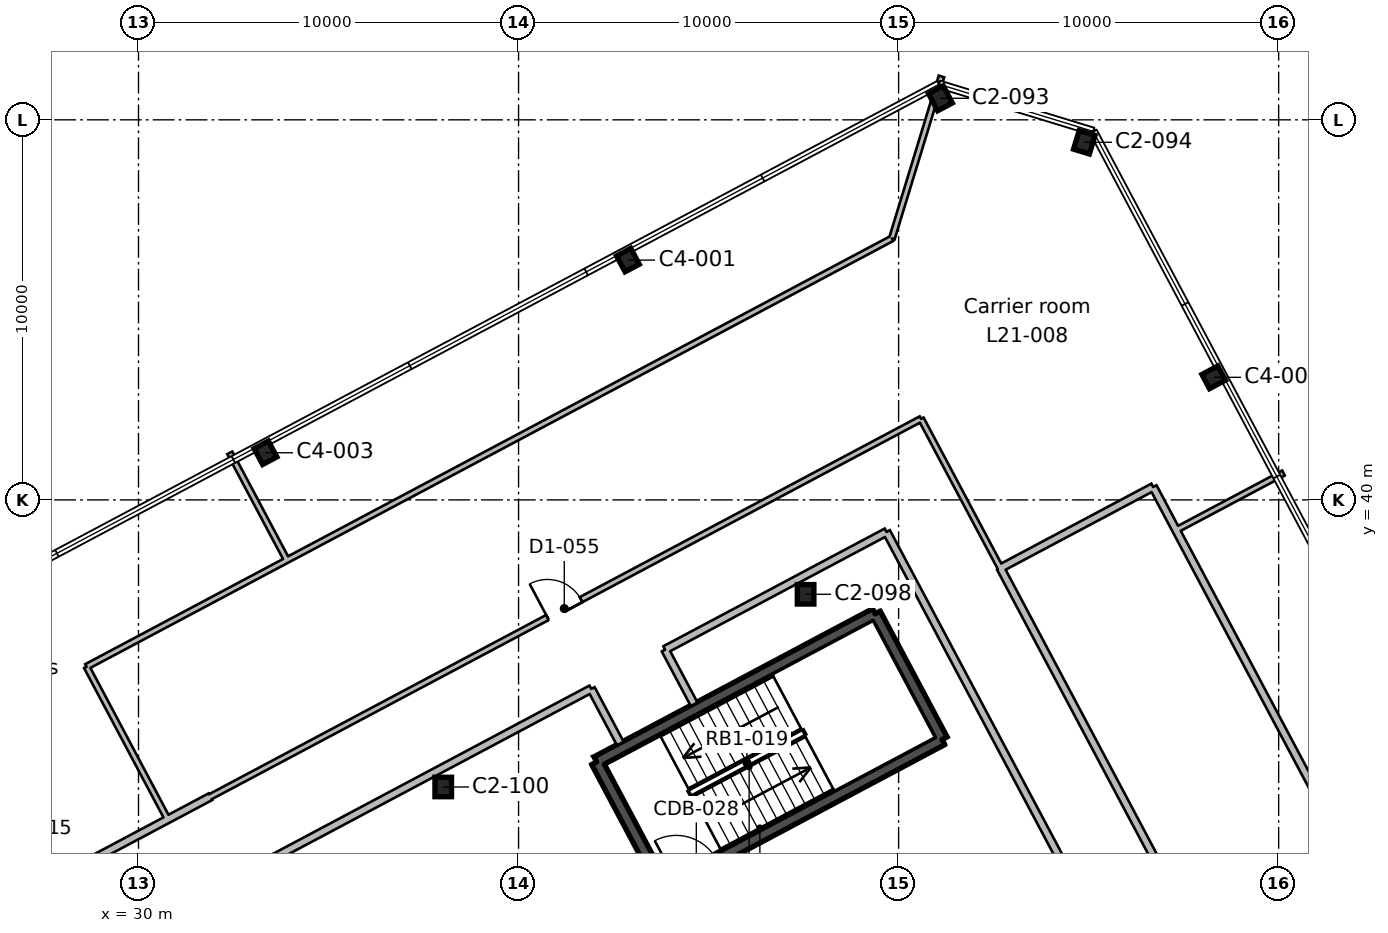
"""IFC4 building model, lengths in metres.
Left out: names, types, materials, properties, quantities, classifications, styles, units other than length and angle.
Written with IfcOpenShell. Run it as: python <this file> out.ifc"""

import sys

from ifc_helpers import new_model, si_unit, direction, frame, frame_2d, origin, origin_2d, place, context, subcontext, project, spatial, rectangle, i_section, extrude, element, fill, save


model = new_model("IFC4")
c1 = context("Model", 3, precision=1e-05, world=origin(), true_north=direction((0.0, 1.0)))
c2 = subcontext(c1, "Body", "Model", "MODEL_VIEW")
j1 = project(units=[si_unit("LENGTHUNIT", "METRE"), si_unit("PLANEANGLEUNIT", "RADIAN")], contexts=[c1])
p1 = place(None, origin())
s1 = spatial("IfcSite", under=j1, at=p1, CompositionType="ELEMENT")
p2 = place(p1, origin())
s2 = spatial("IfcBuilding", under=s1, at=p2, CompositionType="ELEMENT")
p3 = place(p2, frame((0.0, 0.0, 107.6)))
s3 = spatial("IfcBuildingStorey", under=s2, at=p3, CompositionType="ELEMENT", Elevation=107.6)
for number, where, z_axis, x_axis in (
    (1, (38.018, 32.446, 0.0), (0.0, 0.0, 1.0), (1.0, 0.0, 0.0)),
    (2, (47.553, 37.516, 0.0), (0.0, 0.0, 1.0), (1.0, 0.0, 0.0)),
):
    element("IfcColumn", number, at=place(p3, frame(where, z_axis=z_axis, x_axis=x_axis)), inside=s3, PredefinedType="COLUMN", context=c2, shape_type="SweptSolid", body=[
        extrude(i_section(OverallWidth=0.437, OverallDepth=0.513, WebThickness=0.061, FlangeThickness=0.097, FilletRadius=0.015, at=origin_2d()), origin(), (0.0, 0.0, 1.0), 4.6),
    ])
for number, where, z_axis, x_axis in (
    (3, (33.342, 41.24, 0.0), (0.0, 0.0, 1.0), (-0.883, -0.469, 0.0)),
    (4, (58.29, 43.225, 0.0), (0.0, 0.0, 1.0), (-0.469, 0.883, 0.0)),
    (5, (42.877, 46.31, 0.0), (0.0, 0.0, 1.0), (-0.883, -0.469, 0.0)),
):
    element("IfcColumn", number, at=place(p3, frame(where, z_axis=z_axis, x_axis=x_axis)), inside=s3, PredefinedType="COLUMN", context=c2, shape_type="SweptSolid", body=[
        extrude(i_section(OverallWidth=0.424, OverallDepth=0.475, WebThickness=0.048, FlangeThickness=0.077, FilletRadius=0.015, at=origin_2d()), origin(), (0.0, 0.0, 1.0), 4.6),
    ])
for number, where, z_axis, x_axis in (
    (6, (54.886, 49.41, 0.0), (0.0, 0.0, 1.0), (-0.956, 0.292, 0.0)),
    (7, (51.1, 50.567, 0.0), (0.0, 0.0, 1.0), (-0.883, -0.469, 0.0)),
):
    element("IfcColumn", number, at=place(p3, frame(where, z_axis=z_axis, x_axis=x_axis)), inside=s3, PredefinedType="COLUMN", context=c2, shape_type="SweptSolid", body=[
        extrude(i_section(OverallWidth=0.437, OverallDepth=0.513, WebThickness=0.061, FlangeThickness=0.097, FilletRadius=0.015, at=origin_2d()), origin(), (0.0, 0.0, 1.0), 4.6),
    ])
p4 = place(p3, frame((49.384, 37.004, 0.0), z_axis=(0.0, 0.0, 1.0), x_axis=(0.46946936446, -0.882948761726, 0.0)))
e8 = element("IfcWall", 8, at=p4, inside=s3, PredefinedType="SHEAR", context=c2, shape_type="SweptSolid", body=[
    extrude(rectangle(XDim=3.75, YDim=0.3, at=frame_2d((1.875, 0.0))), origin(), (0.0, 0.0, 1.0), 4.6),
])
p5 = place(p3, frame((51.145, 33.693, 0.0), z_axis=(0.0, 0.0, 1.0), x_axis=(-0.882945809314, -0.469474917132, 0.0)))
e9 = element("IfcWall", 9, at=p5, inside=s3, PredefinedType="SHEAR", context=c2, shape_type="SweptSolid", body=[
    extrude(rectangle(XDim=8.3, YDim=0.3, at=frame_2d((4.15, 0.0))), origin(), (0.0, 0.0, 1.0), 4.6),
])
p6 = place(p5, frame((6.725, 0.0, 0.0)))
e10 = element("IfcOpeningElement", 10, at=p6, cuts=e9, PredefinedType="OPENING", context=c2, shape_type="SweptSolid", body=[
    extrude(rectangle(XDim=1.2, YDim=2.1, at=frame_2d((0.6, 1.05))), frame((0.0, 0.16, 0.0), z_axis=(0.0, -1.0, 0.0), x_axis=(1.0, 0.0, 0.0)), (0.0, 0.0, 1.0), 0.32),
])
p7 = place(p3, frame((43.816, 29.796, 0.0), z_axis=(0.0, 0.0, 1.0), x_axis=(-0.46946936446, 0.882948761726, 0.0)))
e11 = element("IfcWall", 11, at=p7, inside=s3, PredefinedType="SHEAR", context=c2, shape_type="SweptSolid", body=[
    extrude(rectangle(XDim=3.75, YDim=0.3, at=frame_2d((1.875, 0.0))), origin(), (0.0, 0.0, 1.0), 4.6),
])
p8 = place(p3, frame((42.055, 33.107, 0.0), z_axis=(0.0, 0.0, 1.0), x_axis=(0.882945809314, 0.469474917132, 0.0)))
e12 = element("IfcWall", 12, at=p8, inside=s3, PredefinedType="SHEAR", context=c2, shape_type="SweptSolid", body=[
    extrude(rectangle(XDim=8.3, YDim=0.3, at=frame_2d((4.15, 0.0))), origin(), (0.0, 0.0, 1.0), 4.6),
])
p9 = place(p3, frame((0.0, 15.233, 0.0), z_axis=(0.0, 0.0, 1.0), x_axis=(0.882948052406, 0.469470698502, 0.0)))
e13 = element("IfcWall", 13, at=p9, inside=s3, PredefinedType="PARTITIONING", context=c2, shape_type="SweptSolid", body=[
    extrude(rectangle(XDim=36.115, YDim=0.2, at=frame_2d((18.058, 0.0))), origin(), (0.0, 0.0, 1.0), 4.15),
])
p10 = place(p9, frame((30.45, 0.0, 0.0)))
e14 = element("IfcOpeningElement", 14, at=p10, cuts=e13, PredefinedType="OPENING", context=c2, shape_type="SweptSolid", body=[
    extrude(rectangle(XDim=0.95, YDim=2.1, at=frame_2d((0.475, 1.05))), frame((0.0, 0.11, 0.0), z_axis=(0.0, -1.0, 0.0), x_axis=(1.0, 0.0, 0.0)), (0.0, 0.0, 1.0), 0.22),
])
p11 = place(p9, frame((19.95, 0.0, 0.0)))
e15 = element("IfcOpeningElement", 15, at=p11, cuts=e13, PredefinedType="OPENING", context=c2, shape_type="SweptSolid", body=[
    extrude(rectangle(XDim=1.0, YDim=2.1, at=frame_2d((0.5, 1.05))), frame((0.0, 0.11, 0.0), z_axis=(0.0, -1.0, 0.0), x_axis=(1.0, 0.0, 0.0)), (0.0, 0.0, 1.0), 0.22),
])
p12 = place(p9, frame((17.55, 0.0, 0.0)))
e16 = element("IfcOpeningElement", 16, at=p12, cuts=e13, PredefinedType="OPENING", context=c2, shape_type="SweptSolid", body=[
    extrude(rectangle(XDim=1.0, YDim=2.1, at=frame_2d((0.5, 1.05))), frame((0.0, 0.11, 0.0), z_axis=(0.0, -1.0, 0.0), x_axis=(1.0, 0.0, 0.0)), (0.0, 0.0, 1.0), 0.22),
])
p13 = place(p3, frame((30.761, 31.608, 0.0), z_axis=(0.0, 0.0, 1.0), x_axis=(-0.469369141446, 0.883002043632, 0.0)))
e17 = element("IfcWall", 17, at=p13, inside=s3, PredefinedType="PARTITIONING", context=c2, shape_type="SweptSolid", body=[
    extrude(rectangle(XDim=4.534, YDim=0.15, at=frame_2d((2.267, 0.0))), origin(), (0.0, 0.0, 1.0), 4.15),
])
p14 = place(p3, frame((28.633, 35.611, 0.0), z_axis=(0.0, 0.0, 1.0), x_axis=(0.882899375274, 0.469562235642, 0.0)))
e18 = element("IfcWall", 18, at=p14, inside=s3, PredefinedType="PARTITIONING", context=c2, shape_type="SweptSolid", body=[
    extrude(rectangle(XDim=5.905, YDim=0.15, at=frame_2d((2.953, 0.0))), origin(), (0.0, 0.0, 1.0), 4.15),
])
p15 = place(p3, frame((52.678, 38.21, 0.0), z_axis=(0.0, 0.0, 1.0), x_axis=(-0.469641219027, 0.882857364126, 0.0)))
e19 = element("IfcWall", 19, at=p15, inside=s3, PredefinedType="PARTITIONING", context=c2, shape_type="SweptSolid", body=[
    extrude(rectangle(XDim=4.444, YDim=0.15, at=frame_2d((2.222, 0.0))), origin(), (0.0, 0.0, 1.0), 4.15),
])
p16 = place(p3, frame((31.888, 32.188, 0.0), z_axis=(0.0, 0.0, 1.0), x_axis=(0.882949135821, 0.469468660884, 0.0)))
e20 = element("IfcWall", 20, at=p16, inside=s3, PredefinedType="PARTITIONING", context=c2, shape_type="SweptSolid", body=[
    extrude(rectangle(XDim=21.184, YDim=0.15, at=frame_2d((10.592, 0.0))), origin(), (0.0, 0.0, 1.0), 4.15),
])
p17 = place(p16, frame((10.05, 0.0, 0.0)))
e21 = element("IfcOpeningElement", 21, at=p17, cuts=e20, PredefinedType="OPENING", context=c2, shape_type="SweptSolid", body=[
    extrude(rectangle(XDim=1.0, YDim=2.1, at=frame_2d((0.5, 1.05))), frame((0.0, 0.085, 0.0), z_axis=(0.0, -1.0, 0.0), x_axis=(1.0, 0.0, 0.0)), (0.0, 0.0, 1.0), 0.17),
])
p18 = place(p3, frame((32.402, 41.239, 0.0), z_axis=(0.0, 0.0, 1.0), x_axis=(0.469447181805, -0.882960556025, 0.0)))
e22 = element("IfcWall", 22, at=p18, inside=s3, PredefinedType="PARTITIONING", context=c2, shape_type="SweptSolid", body=[
    extrude(rectangle(XDim=3.199, YDim=0.15, at=frame_2d((1.6, 0.0))), origin(), (0.0, 0.0, 1.0), 4.15),
])
p19 = place(p3, frame((33.847, 38.384, 0.0), z_axis=(0.0, 0.0, 1.0), x_axis=(0.882976275084, 0.469417615391, 0.0)))
e23 = element("IfcWall", 23, at=p19, inside=s3, PredefinedType="PARTITIONING", context=c2, shape_type="SweptSolid", body=[
    extrude(rectangle(XDim=18.094, YDim=0.15, at=frame_2d((9.047, 0.0))), origin(), (0.0, 0.0, 1.0), 4.15),
])
p20 = place(p3, frame((49.824, 46.878, 0.0), z_axis=(0.0, 0.0, 1.0), x_axis=(0.29242717897, 0.956287794024, 0.0)))
e24 = element("IfcWall", 24, at=p20, inside=s3, PredefinedType="PARTITIONING", context=c2, shape_type="SweptSolid", body=[
    extrude(rectangle(XDim=4.459, YDim=0.15, at=frame_2d((2.229, 0.0))), origin(), (0.0, 0.0, 1.0), 4.15),
])
p21 = place(p3, frame((44.62, 34.623, 0.0), z_axis=(0.0, 0.0, 1.0), x_axis=(-0.46980196406, 0.882771836074, 0.0)))
e25 = element("IfcWall", 25, at=p21, inside=s3, PredefinedType="PARTITIONING", context=c2, shape_type="SweptSolid", body=[
    extrude(rectangle(XDim=1.628, YDim=0.2, at=frame_2d((0.814, 0.0))), origin(), (0.0, 0.0, 1.0), 4.15),
])
p22 = place(p3, frame((43.855, 36.06, 0.0), z_axis=(0.0, 0.0, 1.0), x_axis=(0.882967665993, 0.469433808765, 0.0)))
e26 = element("IfcWall", 26, at=p22, inside=s3, PredefinedType="PARTITIONING", context=c2, shape_type="SweptSolid", body=[
    extrude(rectangle(XDim=6.599, YDim=0.2, at=frame_2d((3.3, 0.0))), origin(), (0.0, 0.0, 1.0), 4.15),
])
p23 = place(p3, frame((49.682, 39.158, 0.0), z_axis=(0.0, 0.0, 1.0), x_axis=(0.469464330369, -0.882951438365, 0.0)))
e27 = element("IfcWall", 27, at=p23, inside=s3, PredefinedType="PARTITIONING", context=c2, shape_type="SweptSolid", body=[
    extrude(rectangle(XDim=22.5, YDim=0.2, at=frame_2d((11.25, 0.0))), origin(), (0.0, 0.0, 1.0), 4.15),
])
p24 = place(p3, frame((30.036, 28.712, 0.0), z_axis=(0.0, 0.0, 1.0), x_axis=(0.882948586986, 0.469469693099, 0.0)))
e28 = element("IfcWall", 28, at=p24, inside=s3, PredefinedType="PARTITIONING", context=c2, shape_type="SweptSolid", body=[
    extrude(rectangle(XDim=13.452, YDim=0.2, at=frame_2d((6.726, 0.0))), origin(), (0.0, 0.0, 1.0), 4.15),
])
p25 = place(p3, frame((41.913, 35.027, 0.0), z_axis=(0.0, 0.0, 1.0), x_axis=(0.469334342094, -0.883020540719, 0.0)))
e29 = element("IfcWall", 29, at=p25, inside=s3, PredefinedType="PARTITIONING", context=c2, shape_type="SweptSolid", body=[
    extrude(rectangle(XDim=1.628, YDim=0.2, at=frame_2d((0.814, 0.0))), origin(), (0.0, 0.0, 1.0), 4.15),
])
p26 = place(p3, frame((52.678, 38.21, 0.0), z_axis=(0.0, 0.0, 1.0), x_axis=(0.469466013918, -0.882950543222, 0.0)))
e30 = element("IfcWall", 30, at=p26, inside=s3, PredefinedType="PARTITIONING", context=c2, shape_type="SweptSolid", body=[
    extrude(rectangle(XDim=22.455, YDim=0.2, at=frame_2d((11.228, 0.0))), origin(), (0.0, 0.0, 1.0), 4.15),
])
p27 = place(p26, frame((10.75, 0.0, 0.0)))
e31 = element("IfcOpeningElement", 31, at=p27, cuts=e30, PredefinedType="OPENING", context=c2, shape_type="SweptSolid", body=[
    extrude(rectangle(XDim=1.0, YDim=2.1, at=frame_2d((0.5, 1.05))), frame((0.0, 0.11, 0.0), z_axis=(0.0, -1.0, 0.0), x_axis=(1.0, 0.0, 0.0)), (0.0, 0.0, 1.0), 0.22),
])
p28 = place(p3, frame((52.681, 38.204, 0.0), z_axis=(0.0, 0.0, 1.0), x_axis=(0.882941964913, 0.46948214726, 0.0)))
e32 = element("IfcWall", 32, at=p28, inside=s3, PredefinedType="PARTITIONING", context=c2, shape_type="SweptSolid", body=[
    extrude(rectangle(XDim=4.55, YDim=0.2, at=frame_2d((2.275, 0.0))), origin(), (0.0, 0.0, 1.0), 4.15),
])
p29 = place(p3, frame((56.698, 40.34, 0.0), z_axis=(0.0, 0.0, 1.0), x_axis=(0.469224785277, -0.883078762559, 0.0)))
e33 = element("IfcWall", 33, at=p29, inside=s3, PredefinedType="PARTITIONING", context=c2, shape_type="SweptSolid", body=[
    extrude(rectangle(XDim=1.283, YDim=0.2, at=frame_2d((0.642, 0.0))), origin(), (0.0, 0.0, 1.0), 4.15),
])
p30 = place(p3, frame((57.3, 39.207, 0.0), z_axis=(0.0, 0.0, 1.0), x_axis=(0.469454330498, -0.882956755213, 0.0)))
e34 = element("IfcWall", 34, at=p30, inside=s3, PredefinedType="PARTITIONING", context=c2, shape_type="SweptSolid", body=[
    extrude(rectangle(XDim=22.716, YDim=0.2, at=frame_2d((11.358, 0.0))), origin(), (0.0, 0.0, 1.0), 4.15),
])
p31 = place(p3, frame((60.127, 40.707, 0.0), z_axis=(0.0, 0.0, 1.0), x_axis=(-0.883027796121, -0.469320691295, 0.0)))
e35 = element("IfcWall", 35, at=p31, inside=s3, PredefinedType="PARTITIONING", context=c2, shape_type="SweptSolid", body=[
    extrude(rectangle(XDim=3.2, YDim=0.15, at=frame_2d((1.6, 0.0))), origin(), (0.0, 0.0, 1.0), 4.15),
])
p32 = place(p17, origin())
e36 = element("IfcDoor", 36, at=p32, inside=s3, OperationType="SINGLE_SWING_LEFT", PredefinedType="DOOR", context=c2, shape_type="SweptSolid", body=[
    extrude(rectangle(XDim=1.0, YDim=2.1, at=frame_2d((0.5, 1.05))), frame((0.0, 0.025, 0.0), z_axis=(0.0, -1.0, 0.0), x_axis=(1.0, 0.0, 0.0)), (0.0, 0.0, 1.0), 0.05),
])
fill(e21, e36)
save(model, sys.argv[1])
